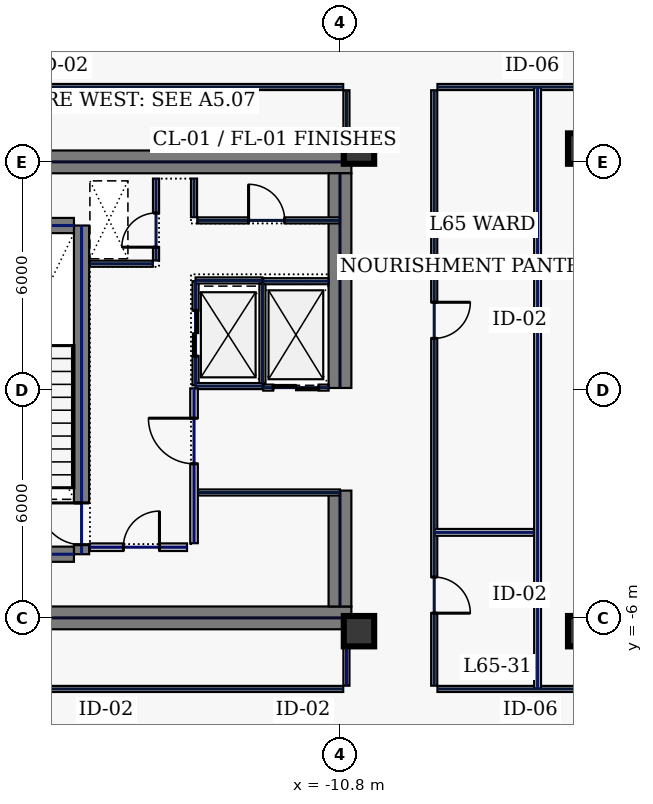
"""IFC4 building model, lengths in metres.
Left out: names, types, materials, properties, quantities, classifications, styles, units other than length and angle.
Written with IfcOpenShell. Run it as: python <this file> out.ifc"""

import sys

from ifc_helpers import new_model, si_unit, direction, frame, frame_2d, origin, origin_2d, place, context, subcontext, project, spatial, rectangle, hollow_rectangle, extrude, element, fill, save


model = new_model("IFC4")
c1 = context("Model", 3, precision=1e-05, world=origin(), true_north=direction((0.0, 1.0)))
c2 = subcontext(c1, "Body", "Model", "MODEL_VIEW")
j1 = project(units=[si_unit("LENGTHUNIT", "METRE"), si_unit("PLANEANGLEUNIT", "RADIAN")], contexts=[c1])
p1 = place(None, origin())
s1 = spatial("IfcSite", under=j1, at=p1, CompositionType="ELEMENT")
p2 = place(p1, origin())
s2 = spatial("IfcBuilding", under=s1, at=p2, CompositionType="ELEMENT")
p3 = place(p2, frame((0.0, 0.0, 281.0)))
s3 = spatial("IfcBuildingStorey", under=s2, at=p3, CompositionType="ELEMENT", Elevation=281.0)
for number, where, z_axis, x_axis in (
    (1, (-22.0, 6.0, 0.0), (0.0, 0.0, 1.0), (1.0, 0.0, 0.0)),
    (2, (-22.0, -6.0, 0.0), (0.0, 0.0, 1.0), (1.0, 0.0, 0.0)),
):
    element("IfcWall", number, at=place(p3, frame(where, z_axis=z_axis, x_axis=x_axis)), inside=s3, PredefinedType="SHEAR", context=c2, shape_type="SweptSolid", body=[
        extrude(rectangle(XDim=11.5, YDim=0.6, at=frame_2d((5.75, 0.0))), origin(), (0.0, 0.0, 1.0), 3.74),
    ])
p4 = place(p3, frame((-10.8, -5.7, 0.0), z_axis=(0.0, 0.0, 1.0), x_axis=(0.0, 1.0, 0.0)))
e3 = element("IfcWall", 3, at=p4, inside=s3, PredefinedType="SHEAR", context=c2, shape_type="SweptSolid", body=[
    extrude(rectangle(XDim=3.05, YDim=0.6, at=frame_2d((1.525, 0.0))), origin(), (0.0, 0.0, 1.0), 3.74),
])
p5 = place(p3, frame((-10.8, 0.05, 0.0), z_axis=(0.0, 0.0, 1.0), x_axis=(0.0, 1.0, 0.0)))
e4 = element("IfcWall", 4, at=p5, inside=s3, PredefinedType="SHEAR", context=c2, shape_type="SweptSolid", body=[
    extrude(rectangle(XDim=5.65, YDim=0.6, at=frame_2d((2.825, 0.0))), origin(), (0.0, 0.0, 1.0), 3.74),
])
p6 = place(p3, frame((-17.6, -4.325, 0.0), z_axis=(0.0, 0.0, 1.0), x_axis=(0.0, 1.0, 0.0)))
e5 = element("IfcWall", 5, at=p6, inside=s3, PredefinedType="SHEAR", context=c2, shape_type="SweptSolid", body=[
    extrude(rectangle(XDim=8.65, YDim=0.4, at=frame_2d((4.325, 0.0))), origin(), (0.0, 0.0, 1.0), 3.74),
])
p7 = place(p6, frame((0.25, 0.0, 0.0)))
e6 = element("IfcOpeningElement", 6, at=p7, cuts=e5, PredefinedType="OPENING", context=c2, shape_type="SweptSolid", body=[
    extrude(rectangle(XDim=1.1, YDim=2.2, at=frame_2d((0.55, 1.1))), frame((0.0, 0.21, 0.0), z_axis=(0.0, -1.0, 0.0), x_axis=(1.0, 0.0, 0.0)), (0.0, 0.0, 1.0), 0.42),
])
for number, where, z_axis, x_axis in (
    (7, (-21.2, -4.325, 0.0), (0.0, 0.0, 1.0), (1.0, 0.0, 0.0)),
    (8, (-21.2, 4.325, 0.0), (0.0, 0.0, 1.0), (1.0, 0.0, 0.0)),
):
    element("IfcWall", number, at=place(p3, frame(where, z_axis=z_axis, x_axis=x_axis)), inside=s3, PredefinedType="SHEAR", context=c2, shape_type="SweptSolid", body=[
        extrude(rectangle(XDim=3.4, YDim=0.4, at=frame_2d((1.7, 0.0))), origin(), (0.0, 0.0, 1.0), 3.74),
    ])
for number, where, z_axis, x_axis in (
    (9, (-10.3, -6.35, 0.0), (0.0, 0.0, 1.0), (1.0, 0.0, 0.0)),
    (10, (-10.3, 6.35, 0.0), (0.0, 0.0, 1.0), (1.0, 0.0, 0.0)),
    (11, (-4.4, -6.35, 0.0), (0.0, 0.0, 1.0), (1.0, 0.0, 0.0)),
    (12, (-4.4, 6.35, 0.0), (0.0, 0.0, 1.0), (1.0, 0.0, 0.0)),
):
    element("IfcColumn", number, at=place(p3, frame(where, z_axis=z_axis, x_axis=x_axis)), inside=s3, PredefinedType="COLUMN", context=c2, shape_type="SweptSolid", body=[
        extrude(hollow_rectangle(XDim=0.8, YDim=0.8, WallThickness=0.036, at=origin_2d()), origin(), (0.0, 0.0, 1.0), 3.74),
    ])
p8 = place(p3, frame((-14.6, 0.12, 0.0), z_axis=(0.0, 0.0, 1.0), x_axis=(0.0, 1.0, 0.0)))
e13 = element("IfcWall", 13, at=p8, inside=s3, PredefinedType="PARTITIONING", context=c2, shape_type="SweptSolid", body=[
    extrude(rectangle(XDim=2.74, YDim=0.16, at=frame_2d((1.37, 0.0))), origin(), (0.0, 0.0, 1.0), 3.74),
])
p9 = place(p8, frame((0.77, 0.0, 0.0)))
e14 = element("IfcOpeningElement", 14, at=p9, cuts=e13, PredefinedType="OPENING", context=c2, shape_type="SweptSolid", body=[
    extrude(rectangle(XDim=1.2, YDim=2.2, at=frame_2d((0.6, 1.1))), frame((0.0, 0.09, 0.0), z_axis=(0.0, -1.0, 0.0), x_axis=(1.0, 0.0, 0.0)), (0.0, 0.0, 1.0), 0.18),
])
for number, where, z_axis, x_axis in (
    (15, (-14.6, 0.1, 0.0), (0.0, 0.0, 1.0), (1.0, 0.0, 0.0)),
    (16, (-14.6, 2.88, 0.0), (0.0, 0.0, 1.0), (1.0, 0.0, 0.0)),
):
    element("IfcWall", number, at=place(p3, frame(where, z_axis=z_axis, x_axis=x_axis)), inside=s3, PredefinedType="PARTITIONING", context=c2, shape_type="SweptSolid", body=[
        extrude(rectangle(XDim=1.76, YDim=0.16, at=frame_2d((0.88, 0.0))), origin(), (0.0, 0.0, 1.0), 3.74),
    ])
p10 = place(p3, frame((-12.84, 0.18, 0.0), z_axis=(0.0, 0.0, 1.0), x_axis=(0.0, 1.0, 0.0)))
e17 = element("IfcWall", 17, at=p10, inside=s3, PredefinedType="PARTITIONING", context=c2, shape_type="SweptSolid", body=[
    extrude(rectangle(XDim=2.62, YDim=0.16, at=frame_2d((1.31, 0.0))), origin(), (0.0, 0.0, 1.0), 3.74),
])
p11 = place(p3, frame((-12.82, 0.06, 0.0), z_axis=(0.0, 0.0, 1.0), x_axis=(1.0, 0.0, 0.0)))
e18 = element("IfcWall", 18, at=p11, inside=s3, PredefinedType="PARTITIONING", context=c2, shape_type="SweptSolid", body=[
    extrude(rectangle(XDim=1.72, YDim=0.16, at=frame_2d((0.86, 0.0))), origin(), (0.0, 0.0, 1.0), 3.74),
])
p12 = place(p11, frame((0.26, 0.0, 0.0)))
e19 = element("IfcOpeningElement", 19, at=p12, cuts=e18, PredefinedType="OPENING", context=c2, shape_type="SweptSolid", body=[
    extrude(rectangle(XDim=1.2, YDim=2.2, at=frame_2d((0.6, 1.1))), frame((0.0, 0.09, 0.0), z_axis=(0.0, -1.0, 0.0), x_axis=(1.0, 0.0, 0.0)), (0.0, 0.0, 1.0), 0.18),
])
p13 = place(p3, frame((-12.82, 2.86, 0.0), z_axis=(0.0, 0.0, 1.0), x_axis=(1.0, 0.0, 0.0)))
e20 = element("IfcWall", 20, at=p13, inside=s3, PredefinedType="PARTITIONING", context=c2, shape_type="SweptSolid", body=[
    extrude(rectangle(XDim=1.72, YDim=0.16, at=frame_2d((0.86, 0.0))), origin(), (0.0, 0.0, 1.0), 3.74),
])
p14 = place(p3, frame((-15.64, 3.405, 0.0), z_axis=(0.0, 0.0, 1.0), x_axis=(0.0, 1.0, 0.0)))
e21 = element("IfcWall", 21, at=p14, inside=s3, PredefinedType="PARTITIONING", context=c2, shape_type="SweptSolid", body=[
    extrude(rectangle(XDim=2.155, YDim=0.16, at=frame_2d((1.078, 0.0))), origin(), (0.0, 0.0, 1.0), 3.74),
])
p15 = place(p14, frame((0.35, 0.0, 0.0)))
e22 = element("IfcOpeningElement", 22, at=p15, cuts=e21, PredefinedType="OPENING", context=c2, shape_type="SweptSolid", body=[
    extrude(rectangle(XDim=0.9, YDim=2.2, at=frame_2d((0.45, 1.1))), frame((0.0, 0.09, 0.0), z_axis=(0.0, -1.0, 0.0), x_axis=(1.0, 0.0, 0.0)), (0.0, 0.0, 1.0), 0.18),
])
p16 = place(p3, frame((-17.38, 3.32, 0.0), z_axis=(0.0, 0.0, 1.0), x_axis=(1.0, 0.0, 0.0)))
e23 = element("IfcWall", 23, at=p16, inside=s3, PredefinedType="PARTITIONING", context=c2, shape_type="SweptSolid", body=[
    extrude(rectangle(XDim=1.655, YDim=0.16, at=frame_2d((0.827, 0.0))), origin(), (0.0, 0.0, 1.0), 3.74),
])
p17 = place(p3, frame((-17.38, -4.14, 0.0), z_axis=(0.0, 0.0, 1.0), x_axis=(1.0, 0.0, 0.0)))
e24 = element("IfcWall", 24, at=p17, inside=s3, PredefinedType="SOLIDWALL", context=c2, shape_type="SweptSolid", body=[
    extrude(rectangle(XDim=2.555, YDim=0.2, at=frame_2d((1.277, 0.0))), origin(), (0.0, 0.0, 1.0), 3.74),
])
p18 = place(p17, frame((0.88, 0.0, 0.0)))
e25 = element("IfcOpeningElement", 25, at=p18, cuts=e24, PredefinedType="OPENING", context=c2, shape_type="SweptSolid", body=[
    extrude(rectangle(XDim=0.95, YDim=2.2, at=frame_2d((0.475, 1.1))), frame((0.0, 0.11, 0.0), z_axis=(0.0, -1.0, 0.0), x_axis=(1.0, 0.0, 0.0)), (0.0, 0.0, 1.0), 0.22),
])
p19 = place(p3, frame((-14.535, -2.7, 0.0), z_axis=(0.0, 0.0, 1.0), x_axis=(1.0, 0.0, 0.0)))
e26 = element("IfcWall", 26, at=p19, inside=s3, PredefinedType="PARTITIONING", context=c2, shape_type="SweptSolid", body=[
    extrude(rectangle(XDim=3.735, YDim=0.16, at=frame_2d((1.867, 0.0))), origin(), (0.0, 0.0, 1.0), 3.74),
])
p20 = place(p3, frame((-14.555, 4.46, 0.0), z_axis=(0.0, 0.0, 1.0), x_axis=(1.0, 0.0, 0.0)))
e27 = element("IfcWall", 27, at=p20, inside=s3, PredefinedType="PARTITIONING", context=c2, shape_type="SweptSolid", body=[
    extrude(rectangle(XDim=3.755, YDim=0.16, at=frame_2d((1.877, 0.0))), origin(), (0.0, 0.0, 1.0), 3.74),
])
p21 = place(p20, frame((1.35, 0.0, 0.0)))
e28 = element("IfcOpeningElement", 28, at=p21, cuts=e27, PredefinedType="OPENING", context=c2, shape_type="SweptSolid", body=[
    extrude(rectangle(XDim=0.95, YDim=2.2, at=frame_2d((0.475, 1.1))), frame((0.0, 0.09, 0.0), z_axis=(0.0, -1.0, 0.0), x_axis=(1.0, 0.0, 0.0)), (0.0, 0.0, 1.0), 0.18),
])
p22 = place(p3, frame((-14.64, 4.545, 0.0), z_axis=(0.0, 0.0, 1.0), x_axis=(0.0, 1.0, 0.0)))
e29 = element("IfcWall", 29, at=p22, inside=s3, PredefinedType="PARTITIONING", context=c2, shape_type="SweptSolid", body=[
    extrude(rectangle(XDim=1.015, YDim=0.16, at=frame_2d((0.508, 0.0))), origin(), (0.0, 0.0, 1.0), 3.74),
])
p23 = place(p3, frame((-14.64, -4.035, 0.0), z_axis=(0.0, 0.0, 1.0), x_axis=(0.0, 1.0, 0.0)))
e30 = element("IfcWall", 30, at=p23, inside=s3, PredefinedType="SOLIDWALL", context=c2, shape_type="SweptSolid", body=[
    extrude(rectangle(XDim=4.075, YDim=0.2, at=frame_2d((2.038, 0.0))), origin(), (0.0, 0.0, 1.0), 3.74),
])
p24 = place(p23, frame((2.09, 0.0, 0.0)))
e31 = element("IfcOpeningElement", 31, at=p24, cuts=e30, PredefinedType="OPENING", context=c2, shape_type="SweptSolid", body=[
    extrude(rectangle(XDim=1.2, YDim=2.2, at=frame_2d((0.6, 1.1))), frame((0.0, 0.11, 0.0), z_axis=(0.0, -1.0, 0.0), x_axis=(1.0, 0.0, 0.0)), (0.0, 0.0, 1.0), 0.22),
])
p25 = place(p3, frame((-3.965, 7.97, 0.0), z_axis=(0.0, 0.0, 1.0), x_axis=(-1.0, 0.0, 0.0)))
e32 = element("IfcWall", 32, at=p25, inside=s3, PredefinedType="PARTITIONING", context=c2, shape_type="SweptSolid", body=[
    extrude(rectangle(XDim=4.27, YDim=0.16, at=frame_2d((2.135, 0.0))), origin(), (0.0, 0.0, 1.0), 3.74),
])
p26 = place(p3, frame((-8.32, 7.885, 0.0), z_axis=(0.0, 0.0, 1.0), x_axis=(0.0, -1.0, 0.0)))
e33 = element("IfcWall", 33, at=p26, inside=s3, PredefinedType="PARTITIONING", context=c2, shape_type="SweptSolid", body=[
    extrude(rectangle(XDim=15.67, YDim=0.16, at=frame_2d((7.835, 0.0))), origin(), (0.0, 0.0, 1.0), 3.74),
])
p27 = place(p26, frame((12.811, 0.0, 0.0)))
e34 = element("IfcOpeningElement", 34, at=p27, cuts=e33, PredefinedType="OPENING", context=c2, shape_type="SweptSolid", body=[
    extrude(rectangle(XDim=0.95, YDim=2.2, at=frame_2d((0.475, 1.1))), frame((0.0, 0.09, 0.0), z_axis=(0.0, -1.0, 0.0), x_axis=(1.0, 0.0, 0.0)), (0.0, 0.0, 1.0), 0.18),
])
p28 = place(p26, frame((5.579, 0.0, 0.0)))
e35 = element("IfcOpeningElement", 35, at=p28, cuts=e33, PredefinedType="OPENING", context=c2, shape_type="SweptSolid", body=[
    extrude(rectangle(XDim=0.95, YDim=2.2, at=frame_2d((0.475, 1.1))), frame((0.0, 0.09, 0.0), z_axis=(0.0, -1.0, 0.0), x_axis=(1.0, 0.0, 0.0)), (0.0, 0.0, 1.0), 0.18),
])
p29 = place(p3, frame((-8.235, -7.87, 0.0), z_axis=(0.0, 0.0, 1.0), x_axis=(1.0, 0.0, 0.0)))
e36 = element("IfcWall", 36, at=p29, inside=s3, PredefinedType="PARTITIONING", context=c2, shape_type="SweptSolid", body=[
    extrude(rectangle(XDim=4.27, YDim=0.16, at=frame_2d((2.135, 0.0))), origin(), (0.0, 0.0, 1.0), 3.74),
])
p30 = place(p3, frame((-10.63, -7.785, 0.0), z_axis=(0.0, 0.0, 1.0), x_axis=(0.0, 1.0, 0.0)))
e37 = element("IfcWall", 37, at=p30, inside=s3, PredefinedType="PARTITIONING", context=c2, shape_type="SweptSolid", body=[
    extrude(rectangle(XDim=1.365, YDim=0.16, at=frame_2d((0.683, 0.0))), origin(), (0.0, 0.0, 1.0), 1.535),
])
p31 = place(p3, frame((-10.63, 6.42, 0.0), z_axis=(0.0, 0.0, 1.0), x_axis=(0.0, 1.0, 0.0)))
e38 = element("IfcWall", 38, at=p31, inside=s3, PredefinedType="PARTITIONING", context=c2, shape_type="SweptSolid", body=[
    extrude(rectangle(XDim=1.465, YDim=0.16, at=frame_2d((0.732, 0.0))), origin(), (0.0, 0.0, 1.0), 2.135),
])
for number, where, z_axis, x_axis in (
    (39, (-10.715, 7.97, 0.0), (0.0, 0.0, 1.0), (-1.0, 0.0, 0.0)),
    (40, (-21.915, -7.87, 0.0), (0.0, 0.0, 1.0), (1.0, 0.0, 0.0)),
):
    element("IfcWall", number, at=place(p3, frame(where, z_axis=z_axis, x_axis=x_axis)), inside=s3, PredefinedType="PARTITIONING", context=c2, shape_type="SweptSolid", body=[
        extrude(rectangle(XDim=11.2, YDim=0.16, at=frame_2d((5.6, 0.0))), origin(), (0.0, 0.0, 1.0), 3.74),
    ])
p32 = place(p3, frame((-5.6, -7.865, 0.0), z_axis=(0.0, 0.0, 1.0), x_axis=(0.0, 1.0, 0.0)))
e41 = element("IfcWall", 41, at=p32, inside=s3, PredefinedType="PARTITIONING", context=c2, shape_type="SweptSolid", body=[
    extrude(rectangle(XDim=15.83, YDim=0.18, at=frame_2d((7.915, 0.0))), origin(), (0.0, 0.0, 1.0), 3.74),
])
p33 = place(p3, frame((-8.315, -3.75, 0.0), z_axis=(0.0, 0.0, 1.0), x_axis=(1.0, 0.0, 0.0)))
e42 = element("IfcWall", 42, at=p33, inside=s3, PredefinedType="PARTITIONING", context=c2, shape_type="SweptSolid", body=[
    extrude(rectangle(XDim=2.62, YDim=0.18, at=frame_2d((1.31, 0.0))), origin(), (0.0, 0.0, 1.0), 3.74),
])
p34 = place(p7, origin())
e43 = element("IfcDoor", 43, at=p34, inside=s3, OperationType="SINGLE_SWING_RIGHT", PredefinedType="DOOR", context=c2, shape_type="SweptSolid", body=[
    extrude(rectangle(XDim=1.1, YDim=2.2, at=frame_2d((0.55, 1.1))), frame((0.0, 0.025, 0.0), z_axis=(0.0, -1.0, 0.0), x_axis=(1.0, 0.0, 0.0)), (0.0, 0.0, 1.0), 0.05),
])
fill(e6, e43)
p35 = place(p9, origin())
e44 = element("IfcDoor", 44, at=p35, inside=s3, OperationType="SLIDING_TO_LEFT", PredefinedType="DOOR", context=c2, shape_type="SweptSolid", body=[
    extrude(rectangle(XDim=1.2, YDim=2.2, at=frame_2d((0.6, 1.1))), frame((0.0, 0.025, 0.0), z_axis=(0.0, -1.0, 0.0), x_axis=(1.0, 0.0, 0.0)), (0.0, 0.0, 1.0), 0.05),
])
fill(e14, e44)
p36 = place(p12, origin())
e45 = element("IfcDoor", 45, at=p36, inside=s3, OperationType="SLIDING_TO_LEFT", PredefinedType="DOOR", context=c2, shape_type="SweptSolid", body=[
    extrude(rectangle(XDim=1.2, YDim=2.2, at=frame_2d((0.6, 1.1))), frame((0.0, 0.025, 0.0), z_axis=(0.0, -1.0, 0.0), x_axis=(1.0, 0.0, 0.0)), (0.0, 0.0, 1.0), 0.05),
])
fill(e19, e45)
p37 = place(p15, origin())
e46 = element("IfcDoor", 46, at=p37, inside=s3, OperationType="SINGLE_SWING_LEFT", PredefinedType="DOOR", context=c2, shape_type="SweptSolid", body=[
    extrude(rectangle(XDim=0.9, YDim=2.2, at=frame_2d((0.45, 1.1))), frame((0.0, 0.025, 0.0), z_axis=(0.0, -1.0, 0.0), x_axis=(1.0, 0.0, 0.0)), (0.0, 0.0, 1.0), 0.05),
])
fill(e22, e46)
p38 = place(p18, origin())
e47 = element("IfcDoor", 47, at=p38, inside=s3, OperationType="SINGLE_SWING_RIGHT", PredefinedType="DOOR", context=c2, shape_type="SweptSolid", body=[
    extrude(rectangle(XDim=0.95, YDim=2.2, at=frame_2d((0.475, 1.1))), frame((0.0, 0.025, 0.0), z_axis=(0.0, -1.0, 0.0), x_axis=(1.0, 0.0, 0.0)), (0.0, 0.0, 1.0), 0.05),
])
fill(e25, e47)
p39 = place(p21, origin())
e48 = element("IfcDoor", 48, at=p39, inside=s3, OperationType="SINGLE_SWING_LEFT", PredefinedType="DOOR", context=c2, shape_type="SweptSolid", body=[
    extrude(rectangle(XDim=0.95, YDim=2.2, at=frame_2d((0.475, 1.1))), frame((0.0, 0.025, 0.0), z_axis=(0.0, -1.0, 0.0), x_axis=(1.0, 0.0, 0.0)), (0.0, 0.0, 1.0), 0.05),
])
fill(e28, e48)
p40 = place(p24, origin())
e49 = element("IfcDoor", 49, at=p40, inside=s3, OperationType="SINGLE_SWING_RIGHT", PredefinedType="DOOR", context=c2, shape_type="SweptSolid", body=[
    extrude(rectangle(XDim=1.2, YDim=2.2, at=frame_2d((0.6, 1.1))), frame((0.0, 0.025, 0.0), z_axis=(0.0, -1.0, 0.0), x_axis=(1.0, 0.0, 0.0)), (0.0, 0.0, 1.0), 0.05),
])
fill(e31, e49)
p41 = place(p27, origin())
e50 = element("IfcDoor", 50, at=p41, inside=s3, OperationType="SINGLE_SWING_RIGHT", PredefinedType="DOOR", context=c2, shape_type="SweptSolid", body=[
    extrude(rectangle(XDim=0.95, YDim=2.2, at=frame_2d((0.475, 1.1))), frame((0.0, 0.025, 0.0), z_axis=(0.0, -1.0, 0.0), x_axis=(1.0, 0.0, 0.0)), (0.0, 0.0, 1.0), 0.05),
])
fill(e34, e50)
p42 = place(p28, origin())
e51 = element("IfcDoor", 51, at=p42, inside=s3, OperationType="SINGLE_SWING_LEFT", PredefinedType="DOOR", context=c2, shape_type="SweptSolid", body=[
    extrude(rectangle(XDim=0.95, YDim=2.2, at=frame_2d((0.475, 1.1))), frame((0.0, 0.025, 0.0), z_axis=(0.0, -1.0, 0.0), x_axis=(1.0, 0.0, 0.0)), (0.0, 0.0, 1.0), 0.05),
])
fill(e35, e51)
save(model, sys.argv[1])
